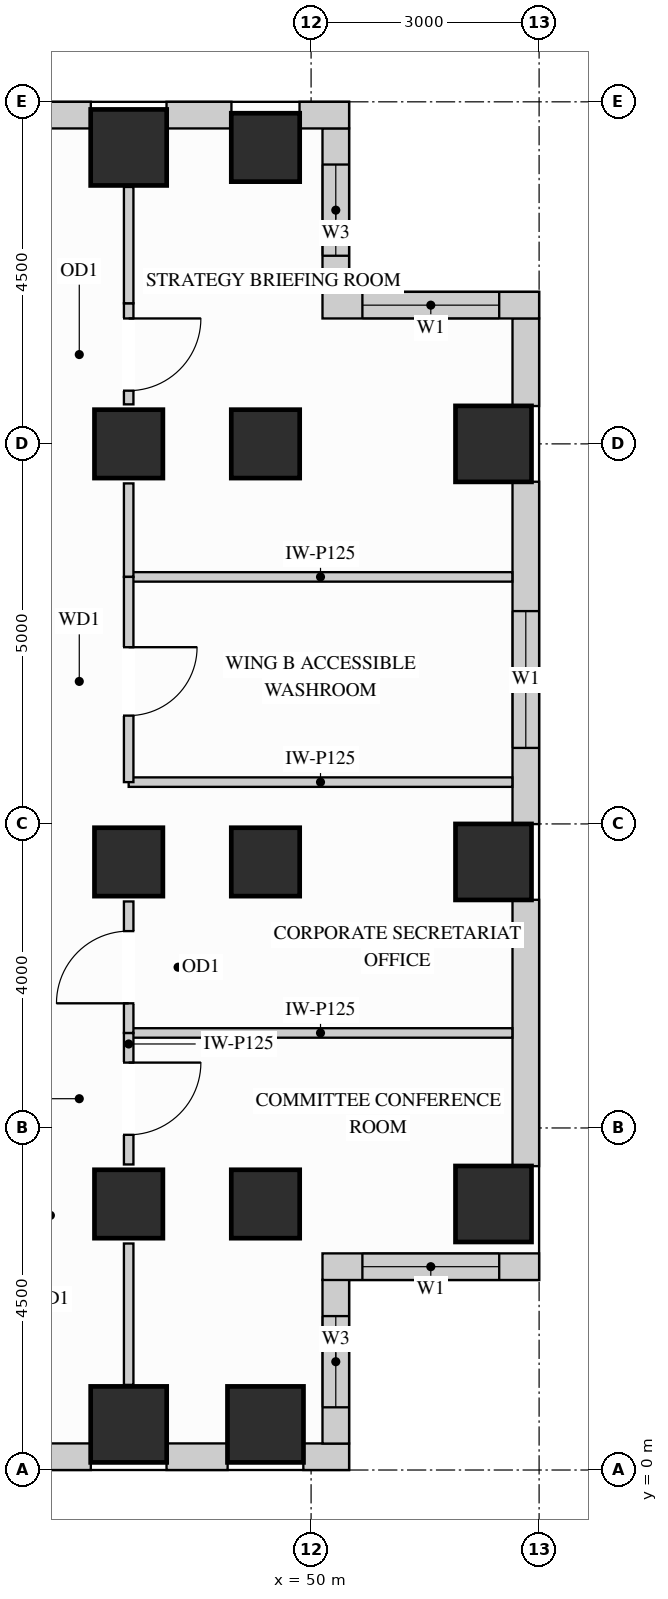
"""IFC4 building model, lengths in metres.
Left out: names, types, materials, properties, quantities, classifications, styles, units other than length and angle.
Written with IfcOpenShell. Run it as: python <this file> out.ifc"""

import sys

from ifc_helpers import new_model, si_unit, direction, frame, frame_2d, origin, origin_2d, place, context, subcontext, project, spatial, rectangle, extrude, source, transform, mapped, element, fill, save


model = new_model("IFC4")
c1 = context("Model", 3, precision=1e-05, world=origin(), true_north=direction((0.0, 1.0)))
c2 = subcontext(c1, "Body", "Model", "MODEL_VIEW")
j1 = project(units=[si_unit("LENGTHUNIT", "METRE"), si_unit("PLANEANGLEUNIT", "RADIAN")], contexts=[c1])
p1 = place(None, origin())
s1 = spatial("IfcSite", under=j1, at=p1, CompositionType="ELEMENT")
p2 = place(p1, origin())
s2 = spatial("IfcBuilding", under=s1, at=p2, CompositionType="ELEMENT")
p3 = place(p2, frame((0.0, 0.0, 179.1)))
s3 = spatial("IfcBuildingStorey", under=s2, at=p3, CompositionType="ELEMENT", Elevation=179.1)
m1 = source(origin(), c2, "Body", "SweptSolid", [
    extrude(rectangle(XDim=0.9, YDim=0.9, at=origin_2d()), origin(), (0.0, 0.0, 1.0), 3.4),
])
for number, where, z_axis, x_axis in (
    (1, (47.6, 13.5, 0.0), (0.0, 0.0, 1.0), (1.0, 0.0, 0.0)),
    (2, (47.6, 3.5, 0.0), (0.0, 0.0, 1.0), (1.0, 0.0, 0.0)),
    (3, (47.6, 8.0, 0.0), (0.0, 0.0, 1.0), (1.0, 0.0, 0.0)),
    (4, (49.4, 13.5, 0.0), (0.0, 0.0, 1.0), (1.0, 0.0, 0.0)),
    (5, (49.4, 17.4, 0.0), (0.0, 0.0, 1.0), (1.0, 0.0, 0.0)),
    (6, (49.4, 3.5, 0.0), (0.0, 0.0, 1.0), (1.0, 0.0, 0.0)),
    (7, (49.4, 8.0, 0.0), (0.0, 0.0, 1.0), (1.0, 0.0, 0.0)),
):
    element("IfcColumn", number, at=place(p3, frame(where, z_axis=z_axis, x_axis=x_axis)), inside=s3, PredefinedType="COLUMN", context=c2, shape_type="MappedRepresentation", body=[
        mapped(m1, transform((0.0, 0.0, 0.0), x_axis=(1.0, 0.0, 0.0), y_axis=(0.0, 1.0, 0.0), z_axis=(0.0, 0.0, 1.0))),
    ])
m2 = source(origin(), c2, "Body", "SweptSolid", [
    extrude(rectangle(XDim=1.0, YDim=1.0, at=origin_2d()), origin(), (0.0, 0.0, 1.0), 3.4),
])
for number, where, z_axis, x_axis in (
    (8, (47.6, 17.4, 0.0), (0.0, 0.0, 1.0), (1.0, 0.0, 0.0)),
    (9, (52.4, 13.5, 0.0), (0.0, 0.0, 1.0), (1.0, 0.0, 0.0)),
    (10, (52.4, 3.5, 0.0), (0.0, 0.0, 1.0), (1.0, 0.0, 0.0)),
    (11, (52.4, 8.0, 0.0), (0.0, 0.0, 1.0), (1.0, 0.0, 0.0)),
    (12, (47.6, 0.6, 0.0), (0.0, 0.0, 1.0), (1.0, 0.0, 0.0)),
    (13, (49.4, 0.6, 0.0), (0.0, 0.0, 1.0), (1.0, 0.0, 0.0)),
):
    element("IfcColumn", number, at=place(p3, frame(where, z_axis=z_axis, x_axis=x_axis)), inside=s3, PredefinedType="COLUMN", context=c2, shape_type="MappedRepresentation", body=[
        mapped(m2, transform((0.0, 0.0, 0.0), x_axis=(1.0, 0.0, 0.0), y_axis=(0.0, 1.0, 0.0), z_axis=(0.0, 0.0, 1.0))),
    ])
p4 = place(p3, frame((40.498, 0.175, 0.0), z_axis=(0.0, 0.0, 1.0), x_axis=(1.0, 0.0, 0.0)))
e14 = element("IfcWall", 14, at=p4, inside=s3, PredefinedType="SOLIDWALL", context=c2, shape_type="SweptSolid", body=[
    extrude(rectangle(XDim=6.604, YDim=0.35, at=frame_2d((3.302, 0.0))), origin(), (0.0, 0.0, 1.0), 2.612),
])
p5 = place(p4, frame((0.737, 0.0, 0.78)))
e15 = element("IfcOpeningElement", 15, at=p5, cuts=e14, PredefinedType="OPENING", context=c2, shape_type="SweptSolid", body=[
    extrude(rectangle(XDim=1.8, YDim=1.652, at=frame_2d((0.9, 0.826))), frame((0.0, 0.185, 0.0), z_axis=(0.0, -1.0, 0.0), x_axis=(1.0, 0.0, 0.0)), (0.0, 0.0, 1.0), 0.37),
])
p6 = place(p4, frame((2.955, 0.0, 0.78)))
e16 = element("IfcOpeningElement", 16, at=p6, cuts=e14, PredefinedType="OPENING", context=c2, shape_type="SweptSolid", body=[
    extrude(rectangle(XDim=1.8, YDim=1.652, at=frame_2d((0.9, 0.826))), frame((0.0, 0.185, 0.0), z_axis=(0.0, -1.0, 0.0), x_axis=(1.0, 0.0, 0.0)), (0.0, 0.0, 1.0), 0.37),
])
m3 = source(origin(), c2, "Body", "SweptSolid", [
    extrude(rectangle(XDim=0.804, YDim=0.35, at=frame_2d((0.402, 0.0))), origin(), (0.0, 0.0, 1.0), 3.385),
])
p7 = place(p3, frame((48.098, 0.175, 0.0), z_axis=(0.0, 0.0, 1.0), x_axis=(1.0, 0.0, 0.0)))
e17 = element("IfcWall", 17, at=p7, inside=s3, PredefinedType="SOLIDWALL", context=c2, shape_type="MappedRepresentation", body=[
    mapped(m3, transform((0.0, 0.0, 0.0), x_axis=(1.0, 0.0, 0.0), y_axis=(0.0, 1.0, 0.0), z_axis=(0.0, 0.0, 1.0))),
])
m4 = source(origin(), c2, "Body", "SweptSolid", [
    extrude(rectangle(XDim=0.602, YDim=0.35, at=frame_2d((0.301, 0.0))), origin(), (0.0, 0.0, 1.0), 3.385),
])
p8 = place(p3, frame((49.898, 0.175, 0.0), z_axis=(0.0, 0.0, 1.0), x_axis=(1.0, 0.0, 0.0)))
e18 = element("IfcWall", 18, at=p8, inside=s3, PredefinedType="SOLIDWALL", context=c2, shape_type="MappedRepresentation", body=[
    mapped(m4, transform((0.0, 0.0, 0.0), x_axis=(1.0, 0.0, 0.0), y_axis=(0.0, 1.0, 0.0), z_axis=(0.0, 0.0, 1.0))),
])
p9 = place(p3, frame((50.325, 0.348, 0.0), z_axis=(0.0, 0.0, 1.0), x_axis=(0.0, 1.0, 0.0)))
e19 = element("IfcWall", 19, at=p9, inside=s3, PredefinedType="SOLIDWALL", context=c2, shape_type="SweptSolid", body=[
    extrude(rectangle(XDim=2.154, YDim=0.35, at=frame_2d((1.077, 0.0))), origin(), (0.0, 0.0, 1.0), 3.385),
])
p10 = place(p9, frame((0.477, 0.0, 0.78)))
e20 = element("IfcOpeningElement", 20, at=p10, cuts=e19, PredefinedType="OPENING", context=c2, shape_type="SweptSolid", body=[
    extrude(rectangle(XDim=1.2, YDim=2.1, at=frame_2d((0.6, 1.05))), frame((0.0, 0.185, 0.0), z_axis=(0.0, -1.0, 0.0), x_axis=(1.0, 0.0, 0.0)), (0.0, 0.0, 1.0), 0.37),
])
p11 = place(p3, frame((50.15, 2.675, 0.0), z_axis=(0.0, 0.0, 1.0), x_axis=(1.0, 0.0, 0.0)))
e21 = element("IfcWall", 21, at=p11, inside=s3, PredefinedType="SOLIDWALL", context=c2, shape_type="SweptSolid", body=[
    extrude(rectangle(XDim=2.85, YDim=0.35, at=frame_2d((1.425, 0.0))), origin(), (0.0, 0.0, 1.0), 3.385),
])
p12 = place(p11, frame((0.525, 0.0, 0.78)))
e22 = element("IfcOpeningElement", 22, at=p12, cuts=e21, PredefinedType="OPENING", context=c2, shape_type="SweptSolid", body=[
    extrude(rectangle(XDim=1.8, YDim=2.1, at=frame_2d((0.9, 1.05))), frame((0.0, 0.185, 0.0), z_axis=(0.0, -1.0, 0.0), x_axis=(1.0, 0.0, 0.0)), (0.0, 0.0, 1.0), 0.37),
])
m5 = source(origin(), c2, "Body", "SweptSolid", [
    extrude(rectangle(XDim=3.504, YDim=0.35, at=frame_2d((1.752, 0.0))), origin(), (0.0, 0.0, 1.0), 2.612),
])
p13 = place(p3, frame((52.825, 3.998, 0.0), z_axis=(0.0, 0.0, 1.0), x_axis=(0.0, 1.0, 0.0)))
e23 = element("IfcWall", 23, at=p13, inside=s3, PredefinedType="SOLIDWALL", context=c2, shape_type="MappedRepresentation", body=[
    mapped(m5, transform((0.0, 0.0, 0.0), x_axis=(1.0, 0.0, 0.0), y_axis=(0.0, 1.0, 0.0), z_axis=(0.0, 0.0, 1.0))),
])
p14 = place(p3, frame((52.825, 8.498, 0.0), z_axis=(0.0, 0.0, 1.0), x_axis=(0.0, 1.0, 0.0)))
e24 = element("IfcWall", 24, at=p14, inside=s3, PredefinedType="SOLIDWALL", context=c2, shape_type="SweptSolid", body=[
    extrude(rectangle(XDim=4.504, YDim=0.35, at=frame_2d((2.252, 0.0))), origin(), (0.0, 0.0, 1.0), 2.612),
])
p15 = place(p14, frame((1.002, 0.0, 0.78)))
e25 = element("IfcOpeningElement", 25, at=p15, cuts=e24, PredefinedType="OPENING", context=c2, shape_type="SweptSolid", body=[
    extrude(rectangle(XDim=1.8, YDim=1.652, at=frame_2d((0.9, 0.826))), frame((0.0, 0.185, 0.0), z_axis=(0.0, -1.0, 0.0), x_axis=(1.0, 0.0, 0.0)), (0.0, 0.0, 1.0), 0.37),
])
m6 = source(origin(), c2, "Body", "SweptSolid", [
    extrude(rectangle(XDim=1.154, YDim=0.35, at=frame_2d((0.577, 0.0))), origin(), (0.0, 0.0, 1.0), 3.385),
])
p16 = place(p3, frame((52.825, 13.998, 0.0), z_axis=(0.0, 0.0, 1.0), x_axis=(0.0, 1.0, 0.0)))
e26 = element("IfcWall", 26, at=p16, inside=s3, PredefinedType="SOLIDWALL", context=c2, shape_type="MappedRepresentation", body=[
    mapped(m6, transform((0.0, 0.0, 0.0), x_axis=(1.0, 0.0, 0.0), y_axis=(0.0, 1.0, 0.0), z_axis=(0.0, 0.0, 1.0))),
])
p17 = place(p3, frame((53.0, 15.325, 0.0), z_axis=(0.0, 0.0, 1.0), x_axis=(-1.0, 0.0, 0.0)))
e27 = element("IfcWall", 27, at=p17, inside=s3, PredefinedType="SOLIDWALL", context=c2, shape_type="SweptSolid", body=[
    extrude(rectangle(XDim=2.85, YDim=0.35, at=frame_2d((1.425, 0.0))), origin(), (0.0, 0.0, 1.0), 3.385),
])
p18 = place(p17, frame((0.525, 0.0, 0.78)))
e28 = element("IfcOpeningElement", 28, at=p18, cuts=e27, PredefinedType="OPENING", context=c2, shape_type="SweptSolid", body=[
    extrude(rectangle(XDim=1.8, YDim=2.1, at=frame_2d((0.9, 1.05))), frame((0.0, 0.185, 0.0), z_axis=(0.0, -1.0, 0.0), x_axis=(1.0, 0.0, 0.0)), (0.0, 0.0, 1.0), 0.37),
])
p19 = place(p3, frame((50.325, 15.498, 0.0), z_axis=(0.0, 0.0, 1.0), x_axis=(0.0, 1.0, 0.0)))
e29 = element("IfcWall", 29, at=p19, inside=s3, PredefinedType="SOLIDWALL", context=c2, shape_type="SweptSolid", body=[
    extrude(rectangle(XDim=2.154, YDim=0.35, at=frame_2d((1.077, 0.0))), origin(), (0.0, 0.0, 1.0), 3.385),
])
p20 = place(p19, frame((0.477, 0.0, 0.78)))
e30 = element("IfcOpeningElement", 30, at=p20, cuts=e29, PredefinedType="OPENING", context=c2, shape_type="SweptSolid", body=[
    extrude(rectangle(XDim=1.2, YDim=2.1, at=frame_2d((0.6, 1.05))), frame((0.0, 0.185, 0.0), z_axis=(0.0, -1.0, 0.0), x_axis=(1.0, 0.0, 0.0)), (0.0, 0.0, 1.0), 0.37),
])
m7 = source(origin(), c2, "Body", "SweptSolid", [
    extrude(rectangle(XDim=0.652, YDim=0.35, at=frame_2d((0.326, 0.0))), origin(), (0.0, 0.0, 1.0), 3.385),
])
p21 = place(p3, frame((50.5, 17.825, 0.0), z_axis=(0.0, 0.0, 1.0), x_axis=(-1.0, 0.0, 0.0)))
e31 = element("IfcWall", 31, at=p21, inside=s3, PredefinedType="SOLIDWALL", context=c2, shape_type="MappedRepresentation", body=[
    mapped(m7, transform((0.0, 0.0, 0.0), x_axis=(1.0, 0.0, 0.0), y_axis=(0.0, 1.0, 0.0), z_axis=(0.0, 0.0, 1.0))),
])
m8 = source(origin(), c2, "Body", "SweptSolid", [
    extrude(rectangle(XDim=0.854, YDim=0.35, at=frame_2d((0.427, 0.0))), origin(), (0.0, 0.0, 1.0), 3.385),
])
p22 = place(p3, frame((48.952, 17.825, 0.0), z_axis=(0.0, 0.0, 1.0), x_axis=(-1.0, 0.0, 0.0)))
e32 = element("IfcWall", 32, at=p22, inside=s3, PredefinedType="SOLIDWALL", context=c2, shape_type="MappedRepresentation", body=[
    mapped(m8, transform((0.0, 0.0, 0.0), x_axis=(1.0, 0.0, 0.0), y_axis=(0.0, 1.0, 0.0), z_axis=(0.0, 0.0, 1.0))),
])
p23 = place(p3, frame((47.102, 17.825, 0.0), z_axis=(0.0, 0.0, 1.0), x_axis=(-1.0, 0.0, 0.0)))
e33 = element("IfcWall", 33, at=p23, inside=s3, PredefinedType="SOLIDWALL", context=c2, shape_type="SweptSolid", body=[
    extrude(rectangle(XDim=6.604, YDim=0.35, at=frame_2d((3.302, 0.0))), origin(), (0.0, 0.0, 1.0), 2.612),
])
p24 = place(p23, frame((1.849, 0.0, 0.78)))
e34 = element("IfcOpeningElement", 34, at=p24, cuts=e33, PredefinedType="OPENING", context=c2, shape_type="SweptSolid", body=[
    extrude(rectangle(XDim=1.8, YDim=1.652, at=frame_2d((0.9, 0.826))), frame((0.0, 0.185, 0.0), z_axis=(0.0, -1.0, 0.0), x_axis=(1.0, 0.0, 0.0)), (0.0, 0.0, 1.0), 0.37),
])
p25 = place(p23, frame((4.067, 0.0, 0.78)))
e35 = element("IfcOpeningElement", 35, at=p25, cuts=e33, PredefinedType="OPENING", context=c2, shape_type="SweptSolid", body=[
    extrude(rectangle(XDim=1.8, YDim=1.652, at=frame_2d((0.9, 0.826))), frame((0.0, 0.185, 0.0), z_axis=(0.0, -1.0, 0.0), x_axis=(1.0, 0.0, 0.0)), (0.0, 0.0, 1.0), 0.37),
])
m9 = source(origin(), c2, "Body", "SweptSolid", [
    extrude(rectangle(XDim=5.048, YDim=0.125, at=frame_2d((2.524, 0.0))), origin(), (0.0, 0.0, 1.0), 2.916),
])
p26 = place(p3, frame((47.6, 11.75, 0.0), z_axis=(0.0, 0.0, 1.0), x_axis=(1.0, 0.0, 0.0)))
e36 = element("IfcWall", 36, at=p26, inside=s3, PredefinedType="PARTITIONING", context=c2, shape_type="MappedRepresentation", body=[
    mapped(m9, transform((0.0, 0.0, 0.0), x_axis=(1.0, 0.0, 0.0), y_axis=(0.0, 1.0, 0.0), z_axis=(0.0, 0.0, 1.0))),
])
m10 = source(origin(), c2, "Body", "SweptSolid", [
    extrude(rectangle(XDim=5.048, YDim=0.125, at=frame_2d((2.524, 0.0))), origin(), (0.0, 0.0, 1.0), 3.385),
])
for number, where, z_axis, x_axis in (
    (37, (47.6, 5.75, 0.0), (0.0, 0.0, 1.0), (1.0, 0.0, 0.0)),
    (38, (47.6, 9.05, 0.0), (0.0, 0.0, 1.0), (1.0, 0.0, 0.0)),
):
    element("IfcWall", number, at=place(p3, frame(where, z_axis=z_axis, x_axis=x_axis)), inside=s3, PredefinedType="PARTITIONING", context=c2, shape_type="MappedRepresentation", body=[
        mapped(m10, transform((0.0, 0.0, 0.0), x_axis=(1.0, 0.0, 0.0), y_axis=(0.0, 1.0, 0.0), z_axis=(0.0, 0.0, 1.0))),
    ])
p27 = place(p3, frame((47.6, 4.02, 0.0), z_axis=(0.0, 0.0, 1.0), x_axis=(0.0, 1.0, 0.0)))
e39 = element("IfcWall", 39, at=p27, inside=s3, PredefinedType="PARTITIONING", context=c2, shape_type="SweptSolid", body=[
    extrude(rectangle(XDim=1.73, YDim=0.125, at=frame_2d((0.865, 0.0))), origin(), (0.0, 0.0, 1.0), 2.773),
])
p28 = place(p27, frame((0.39, 0.0, 0.0)))
e40 = element("IfcOpeningElement", 40, at=p28, cuts=e39, PredefinedType="OPENING", context=c2, shape_type="SweptSolid", body=[
    extrude(rectangle(XDim=0.95, YDim=2.15, at=frame_2d((0.475, 1.075))), frame((0.0, 0.073, 0.0), z_axis=(0.0, -1.0, 0.0), x_axis=(1.0, 0.0, 0.0)), (0.0, 0.0, 1.0), 0.145),
])
m11 = source(origin(), c2, "Body", "SweptSolid", [
    extrude(rectangle(XDim=1.86, YDim=0.125, at=frame_2d((0.93, 0.0))), origin(), (0.0, 0.0, 1.0), 2.773),
])
p29 = place(p3, frame((47.6, 1.12, 0.0), z_axis=(0.0, 0.0, 1.0), x_axis=(0.0, 1.0, 0.0)))
e41 = element("IfcWall", 41, at=p29, inside=s3, PredefinedType="PARTITIONING", context=c2, shape_type="MappedRepresentation", body=[
    mapped(m11, transform((0.0, 0.0, 0.0), x_axis=(1.0, 0.0, 0.0), y_axis=(0.0, 1.0, 0.0), z_axis=(0.0, 0.0, 1.0))),
])
p30 = place(p3, frame((47.6, 5.75, 0.0), z_axis=(0.0, 0.0, 1.0), x_axis=(0.0, 1.0, 0.0)))
e42 = element("IfcWall", 42, at=p30, inside=s3, PredefinedType="PARTITIONING", context=c2, shape_type="SweptSolid", body=[
    extrude(rectangle(XDim=1.73, YDim=0.125, at=frame_2d((0.865, 0.0))), origin(), (0.0, 0.0, 1.0), 2.773),
])
p31 = place(p30, frame((0.39, 0.0, 0.0)))
e43 = element("IfcOpeningElement", 43, at=p31, cuts=e42, PredefinedType="OPENING", context=c2, shape_type="SweptSolid", body=[
    extrude(rectangle(XDim=0.95, YDim=2.15, at=frame_2d((0.475, 1.075))), frame((0.0, 0.073, 0.0), z_axis=(0.0, -1.0, 0.0), x_axis=(1.0, 0.0, 0.0)), (0.0, 0.0, 1.0), 0.145),
])
m12 = source(origin(), c2, "Body", "SweptSolid", [
    extrude(rectangle(XDim=1.23, YDim=0.125, at=frame_2d((0.615, 0.0))), origin(), (0.0, 0.0, 1.0), 2.773),
])
p32 = place(p3, frame((47.6, 11.75, 0.0), z_axis=(0.0, 0.0, 1.0), x_axis=(0.0, 1.0, 0.0)))
e44 = element("IfcWall", 44, at=p32, inside=s3, PredefinedType="PARTITIONING", context=c2, shape_type="MappedRepresentation", body=[
    mapped(m12, transform((0.0, 0.0, 0.0), x_axis=(1.0, 0.0, 0.0), y_axis=(0.0, 1.0, 0.0), z_axis=(0.0, 0.0, 1.0))),
])
p33 = place(p3, frame((47.6, 14.02, 0.0), z_axis=(0.0, 0.0, 1.0), x_axis=(0.0, 1.0, 0.0)))
e45 = element("IfcWall", 45, at=p33, inside=s3, PredefinedType="PARTITIONING", context=c2, shape_type="SweptSolid", body=[
    extrude(rectangle(XDim=1.33, YDim=0.125, at=frame_2d((0.665, 0.0))), origin(), (0.0, 0.0, 1.0), 2.773),
])
p34 = place(p33, frame((0.18, 0.0, 0.0)))
e46 = element("IfcOpeningElement", 46, at=p34, cuts=e45, PredefinedType="OPENING", context=c2, shape_type="SweptSolid", body=[
    extrude(rectangle(XDim=0.95, YDim=2.15, at=frame_2d((0.475, 1.075))), frame((0.0, 0.073, 0.0), z_axis=(0.0, -1.0, 0.0), x_axis=(1.0, 0.0, 0.0)), (0.0, 0.0, 1.0), 0.145),
])
m13 = source(origin(), c2, "Body", "SweptSolid", [
    extrude(rectangle(XDim=1.53, YDim=0.125, at=frame_2d((0.765, 0.0))), origin(), (0.0, 0.0, 1.0), 2.773),
])
p35 = place(p3, frame((47.6, 15.35, 0.0), z_axis=(0.0, 0.0, 1.0), x_axis=(0.0, 1.0, 0.0)))
e47 = element("IfcWall", 47, at=p35, inside=s3, PredefinedType="PARTITIONING", context=c2, shape_type="MappedRepresentation", body=[
    mapped(m13, transform((0.0, 0.0, 0.0), x_axis=(1.0, 0.0, 0.0), y_axis=(0.0, 1.0, 0.0), z_axis=(0.0, 0.0, 1.0))),
])
p36 = place(p3, frame((47.6, 9.05, 0.0), z_axis=(0.0, 0.0, 1.0), x_axis=(0.0, 1.0, 0.0)))
e48 = element("IfcWall", 48, at=p36, inside=s3, PredefinedType="PARTITIONING", context=c2, shape_type="SweptSolid", body=[
    extrude(rectangle(XDim=2.7, YDim=0.125, at=frame_2d((1.35, 0.0))), origin(), (0.0, 0.0, 1.0), 2.773),
])
p37 = place(p36, frame((0.875, 0.0, 0.0)))
e49 = element("IfcOpeningElement", 49, at=p37, cuts=e48, PredefinedType="OPENING", context=c2, shape_type="SweptSolid", body=[
    extrude(rectangle(XDim=0.9, YDim=2.15, at=frame_2d((0.45, 1.075))), frame((0.0, 0.073, 0.0), z_axis=(0.0, -1.0, 0.0), x_axis=(1.0, 0.0, 0.0)), (0.0, 0.0, 1.0), 0.145),
])
m14 = source(origin(), c2, "Body", "SweptSolid", [
    extrude(rectangle(XDim=0.95, YDim=2.15, at=frame_2d((0.475, 1.075))), frame((0.0, 0.025, 0.0), z_axis=(0.0, -1.0, 0.0), x_axis=(1.0, 0.0, 0.0)), (0.0, 0.0, 1.0), 0.05),
])
p38 = place(p28, origin())
e50 = element("IfcDoor", 50, at=p38, inside=s3, OperationType="SINGLE_SWING_RIGHT", PredefinedType="DOOR", context=c2, shape_type="MappedRepresentation", body=[
    mapped(m14, transform((0.0, 0.0, 0.0), x_axis=(1.0, 0.0, 0.0), y_axis=(0.0, 1.0, 0.0), z_axis=(0.0, 0.0, 1.0))),
])
fill(e40, e50)
p39 = place(p31, origin())
e51 = element("IfcDoor", 51, at=p39, inside=s3, OperationType="SINGLE_SWING_LEFT", PredefinedType="DOOR", context=c2, shape_type="MappedRepresentation", body=[
    mapped(m14, transform((0.0, 0.0, 0.0), x_axis=(1.0, 0.0, 0.0), y_axis=(0.0, 1.0, 0.0), z_axis=(0.0, 0.0, 1.0))),
])
fill(e43, e51)
p40 = place(p34, origin())
e52 = element("IfcDoor", 52, at=p40, inside=s3, OperationType="SINGLE_SWING_RIGHT", PredefinedType="DOOR", context=c2, shape_type="MappedRepresentation", body=[
    mapped(m14, transform((0.0, 0.0, 0.0), x_axis=(1.0, 0.0, 0.0), y_axis=(0.0, 1.0, 0.0), z_axis=(0.0, 0.0, 1.0))),
])
fill(e46, e52)
m15 = source(origin(), c2, "Body", "SweptSolid", [
    extrude(rectangle(XDim=0.9, YDim=2.15, at=frame_2d((0.45, 1.075))), frame((0.0, 0.025, 0.0), z_axis=(0.0, -1.0, 0.0), x_axis=(1.0, 0.0, 0.0)), (0.0, 0.0, 1.0), 0.05),
])
p41 = place(p37, origin())
e53 = element("IfcDoor", 53, at=p41, inside=s3, OperationType="SINGLE_SWING_RIGHT", PredefinedType="DOOR", context=c2, shape_type="MappedRepresentation", body=[
    mapped(m15, transform((0.0, 0.0, 0.0), x_axis=(1.0, 0.0, 0.0), y_axis=(0.0, 1.0, 0.0), z_axis=(0.0, 0.0, 1.0))),
])
fill(e49, e53)
m16 = source(origin(), c2, "Body", "SweptSolid", [
    extrude(rectangle(XDim=1.8, YDim=2.1, at=frame_2d((0.9, 1.05))), frame((0.0, 0.03, 0.0), z_axis=(0.0, -1.0, 0.0), x_axis=(1.0, 0.0, 0.0)), (0.0, 0.0, 1.0), 0.06),
])
p42 = place(p12, origin())
e54 = element("IfcWindow", 54, at=p42, inside=s3, PartitioningType="SINGLE_PANEL", PredefinedType="WINDOW", context=c2, shape_type="MappedRepresentation", body=[
    mapped(m16, transform((0.0, 0.0, 0.0), x_axis=(1.0, 0.0, 0.0), y_axis=(0.0, 1.0, 0.0), z_axis=(0.0, 0.0, 1.0))),
])
fill(e22, e54)
m17 = source(origin(), c2, "Body", "SweptSolid", [
    extrude(rectangle(XDim=1.8, YDim=1.652, at=frame_2d((0.9, 0.826))), frame((0.0, 0.03, 0.0), z_axis=(0.0, -1.0, 0.0), x_axis=(1.0, 0.0, 0.0)), (0.0, 0.0, 1.0), 0.06),
])
p43 = place(p15, origin())
e55 = element("IfcWindow", 55, at=p43, inside=s3, PartitioningType="SINGLE_PANEL", PredefinedType="WINDOW", context=c2, shape_type="MappedRepresentation", body=[
    mapped(m17, transform((0.0, 0.0, 0.0), x_axis=(1.0, 0.0, 0.0), y_axis=(0.0, 1.0, 0.0), z_axis=(0.0, 0.0, 1.0))),
])
fill(e25, e55)
p44 = place(p18, origin())
e56 = element("IfcWindow", 56, at=p44, inside=s3, PartitioningType="SINGLE_PANEL", PredefinedType="WINDOW", context=c2, shape_type="MappedRepresentation", body=[
    mapped(m16, transform((0.0, 0.0, 0.0), x_axis=(1.0, 0.0, 0.0), y_axis=(0.0, 1.0, 0.0), z_axis=(0.0, 0.0, 1.0))),
])
fill(e28, e56)
m18 = source(origin(), c2, "Body", "SweptSolid", [
    extrude(rectangle(XDim=1.2, YDim=2.1, at=frame_2d((0.6, 1.05))), frame((0.0, 0.03, 0.0), z_axis=(0.0, -1.0, 0.0), x_axis=(1.0, 0.0, 0.0)), (0.0, 0.0, 1.0), 0.06),
])
p45 = place(p10, origin())
e57 = element("IfcWindow", 57, at=p45, inside=s3, PartitioningType="SINGLE_PANEL", PredefinedType="WINDOW", context=c2, shape_type="MappedRepresentation", body=[
    mapped(m18, transform((0.0, 0.0, 0.0), x_axis=(1.0, 0.0, 0.0), y_axis=(0.0, 1.0, 0.0), z_axis=(0.0, 0.0, 1.0))),
])
fill(e20, e57)
p46 = place(p20, origin())
e58 = element("IfcWindow", 58, at=p46, inside=s3, PartitioningType="SINGLE_PANEL", PredefinedType="WINDOW", context=c2, shape_type="MappedRepresentation", body=[
    mapped(m18, transform((0.0, 0.0, 0.0), x_axis=(1.0, 0.0, 0.0), y_axis=(0.0, 1.0, 0.0), z_axis=(0.0, 0.0, 1.0))),
])
fill(e30, e58)
save(model, sys.argv[1])
